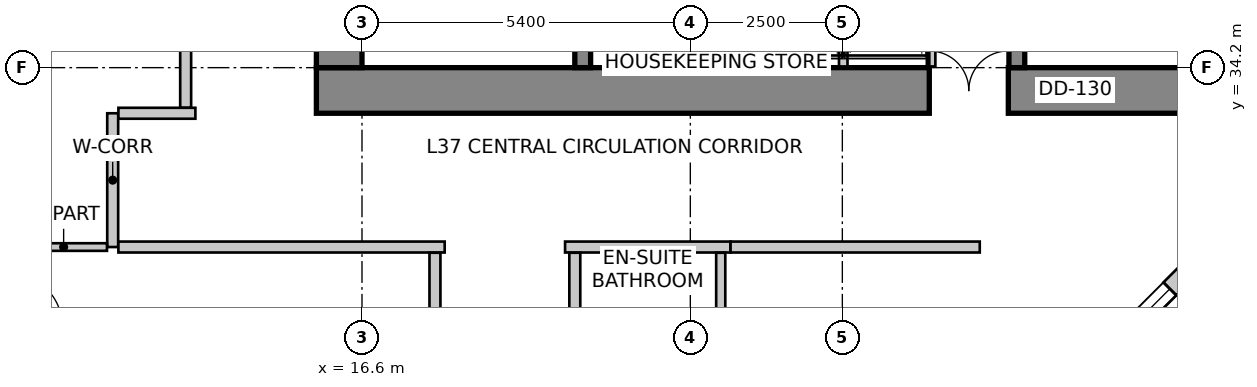
"""IFC4 building model, lengths in metres.
Left out: names, types, materials, properties, quantities, classifications, styles, units other than length and angle.
Written with IfcOpenShell. Run it as: python <this file> out.ifc"""

import sys

from ifc_helpers import new_model, si_unit, direction, frame, frame_2d, origin, place, context, subcontext, project, spatial, rectangle, extrude, source, transform, mapped, element, fill, save


model = new_model("IFC4")
c1 = context("Model", 3, precision=1e-05, world=origin(), true_north=direction((0.0, 1.0)))
c2 = subcontext(c1, "Body", "Model", "MODEL_VIEW")
j1 = project(units=[si_unit("LENGTHUNIT", "METRE"), si_unit("PLANEANGLEUNIT", "RADIAN")], contexts=[c1])
p1 = place(None, origin())
s1 = spatial("IfcSite", under=j1, at=p1, CompositionType="ELEMENT")
p2 = place(p1, origin())
s2 = spatial("IfcBuilding", under=s1, at=p2, CompositionType="ELEMENT")
p3 = place(p2, frame((0.0, 0.0, 150.2)))
s3 = spatial("IfcBuildingStorey", under=s2, at=p3, CompositionType="ELEMENT", Elevation=150.2)
p4 = place(p3, frame((15.85, 33.825, 0.0), z_axis=(0.0, 0.0, 1.0), x_axis=(1.0, 0.0, 0.0)))
e1 = element("IfcWall", 1, at=p4, inside=s3, PredefinedType="SHEAR", context=c2, shape_type="SweptSolid", body=[
    extrude(rectangle(XDim=15.9, YDim=0.75, at=frame_2d((7.95, 0.0))), origin(), (0.0, 0.0, 1.0), 3.6),
])
m1 = source(origin(), c2, "Body", "SweptSolid", [
    extrude(rectangle(XDim=1.3, YDim=2.15, at=frame_2d((0.65, 1.075))), frame((0.0, 0.385, 0.0), z_axis=(0.0, -1.0, 0.0), x_axis=(1.0, 0.0, 0.0)), (0.0, 0.0, 1.0), 0.77),
])
p5 = place(p4, frame((10.08, 0.0, 0.0)))
e2 = element("IfcOpeningElement", 2, at=p5, cuts=e1, PredefinedType="OPENING", context=c2, shape_type="MappedRepresentation", body=[
    mapped(m1, transform((0.0, 0.0, 0.0), scale=1.0)),
])
p6 = place(p3, frame((16.225, 34.2, 0.0), z_axis=(0.0, 0.0, 1.0), x_axis=(0.0, 1.0, 0.0)))
e3 = element("IfcWall", 3, at=p6, inside=s3, PredefinedType="SHEAR", context=c2, shape_type="SweptSolid", body=[
    extrude(rectangle(XDim=11.4, YDim=0.75, at=frame_2d((5.7, 0.0))), origin(), (0.0, 0.0, 1.0), 3.6),
])
m2 = source(origin(), c2, "Body", "SweptSolid", [
    extrude(rectangle(XDim=1.1, YDim=2.15, at=frame_2d((0.55, 1.075))), frame((0.0, 0.385, 0.0), z_axis=(0.0, -1.0, 0.0), x_axis=(1.0, 0.0, 0.0)), (0.0, 0.0, 1.0), 0.77),
])
p7 = place(p6, frame((7.15, 0.0, 0.0)))
e4 = element("IfcOpeningElement", 4, at=p7, cuts=e3, PredefinedType="OPENING", context=c2, shape_type="MappedRepresentation", body=[
    mapped(m2, transform((0.0, 0.0, 0.0), scale=1.0)),
])
p8 = place(p3, frame((20.23, 34.2, 0.0), z_axis=(0.0, 0.0, 1.0), x_axis=(0.0, 1.0, 0.0)))
e5 = element("IfcWall", 5, at=p8, inside=s3, PredefinedType="SHEAR", context=c2, shape_type="SweptSolid", body=[
    extrude(rectangle(XDim=9.06, YDim=0.26, at=frame_2d((4.53, 0.0))), origin(), (0.0, 0.0, 1.0), 3.6),
])
m3 = source(origin(), c2, "Body", "SweptSolid", [
    extrude(rectangle(XDim=1.1, YDim=2.15, at=frame_2d((0.55, 1.075))), frame((0.0, 0.14, 0.0), z_axis=(0.0, -1.0, 0.0), x_axis=(1.0, 0.0, 0.0)), (0.0, 0.0, 1.0), 0.28),
])
p9 = place(p8, frame((7.45, 0.0, 0.0)))
e6 = element("IfcOpeningElement", 6, at=p9, cuts=e5, PredefinedType="OPENING", context=c2, shape_type="MappedRepresentation", body=[
    mapped(m3, transform((0.0, 0.0, 0.0), scale=1.0)),
])
p10 = place(p3, frame((27.37, 34.2, 0.0), z_axis=(0.0, 0.0, 1.0), x_axis=(0.0, 1.0, 0.0)))
e7 = element("IfcWall", 7, at=p10, inside=s3, PredefinedType="SHEAR", context=c2, shape_type="SweptSolid", body=[
    extrude(rectangle(XDim=9.06, YDim=0.26, at=frame_2d((4.53, 0.0))), origin(), (0.0, 0.0, 1.0), 3.6),
])
p11 = place(p10, frame((7.45, 0.0, 0.0)))
e8 = element("IfcOpeningElement", 8, at=p11, cuts=e7, PredefinedType="OPENING", context=c2, shape_type="MappedRepresentation", body=[
    mapped(m3, transform((0.0, 0.0, 0.0), scale=1.0)),
])
p12 = place(p3, frame((28.116, 28.792, 0.0), z_axis=(0.0, 0.0, 1.0), x_axis=(0.707064797706, 0.707148762175, 0.0)))
e9 = element("IfcWall", 9, at=p12, inside=s3, PredefinedType="SOLIDWALL", context=c2, shape_type="SweptSolid", body=[
    extrude(rectangle(XDim=2.908, YDim=0.3, at=frame_2d((1.454, 0.0))), origin(), (0.0, 0.0, 1.0), 3.35),
])
m4 = source(origin(), c2, "Body", "SweptSolid", [
    extrude(rectangle(XDim=2.1, YDim=2.0, at=frame_2d((1.05, 1.0))), frame((0.0, 0.16, 0.0), z_axis=(0.0, -1.0, 0.0), x_axis=(1.0, 0.0, 0.0)), (0.0, 0.0, 1.0), 0.32),
])
p13 = place(p12, frame((0.404, 0.0, 0.85)))
e10 = element("IfcOpeningElement", 10, at=p13, cuts=e9, PredefinedType="OPENING", context=c2, shape_type="MappedRepresentation", body=[
    mapped(m4, transform((0.0, 0.0, 0.0), scale=1.0)),
])
p14 = place(p3, frame((13.269, 47.134, 0.0), z_axis=(0.0, 0.0, 1.0), x_axis=(-0.319929773322, -0.947441259468, 0.0)))
e11 = element("IfcWall", 11, at=p14, inside=s3, PredefinedType="SOLIDWALL", context=c2, shape_type="SweptSolid", body=[
    extrude(rectangle(XDim=16.134, YDim=0.3, at=frame_2d((8.067, 0.0))), origin(), (0.0, 0.0, 1.0), 3.35),
])
p15 = place(p14, frame((2.426, 0.0, 0.85)))
e12 = element("IfcOpeningElement", 12, at=p15, cuts=e11, PredefinedType="OPENING", context=c2, shape_type="MappedRepresentation", body=[
    mapped(m4, transform((0.0, 0.0, 0.0), scale=1.0)),
])
m5 = source(origin(), c2, "Body", "SweptSolid", [
    extrude(rectangle(XDim=2.4, YDim=2.2, at=frame_2d((1.2, 1.1))), frame((0.0, 0.16, 0.0), z_axis=(0.0, -1.0, 0.0), x_axis=(1.0, 0.0, 0.0)), (0.0, 0.0, 1.0), 0.32),
])
p16 = place(p14, frame((7.211, 0.0, 0.85)))
e13 = element("IfcOpeningElement", 13, at=p16, cuts=e11, PredefinedType="OPENING", context=c2, shape_type="MappedRepresentation", body=[
    mapped(m5, transform((0.0, 0.0, 0.0), scale=1.0)),
])
p17 = place(p14, frame((12.296, 0.0, 0.85)))
e14 = element("IfcOpeningElement", 14, at=p17, cuts=e11, PredefinedType="OPENING", context=c2, shape_type="MappedRepresentation", body=[
    mapped(m4, transform((0.0, 0.0, 0.0), scale=1.0)),
])
p18 = place(p3, frame((8.187, 31.834, 0.0), z_axis=(0.0, 0.0, 1.0), x_axis=(0.198869838988, -0.980025911464, 0.0)))
e15 = element("IfcWall", 15, at=p18, inside=s3, PredefinedType="SOLIDWALL", context=c2, shape_type="SweptSolid", body=[
    extrude(rectangle(XDim=16.363, YDim=0.3, at=frame_2d((8.182, 0.0))), origin(), (0.0, 0.0, 1.0), 3.35),
])
m6 = source(origin(), c2, "Body", "SweptSolid", [
    extrude(rectangle(XDim=1.5, YDim=1.8, at=frame_2d((0.75, 0.9))), frame((0.0, 0.16, 0.0), z_axis=(0.0, -1.0, 0.0), x_axis=(1.0, 0.0, 0.0)), (0.0, 0.0, 1.0), 0.32),
])
p19 = place(p18, frame((0.981, 0.0, 0.85)))
e16 = element("IfcOpeningElement", 16, at=p19, cuts=e15, PredefinedType="OPENING", context=c2, shape_type="MappedRepresentation", body=[
    mapped(m6, transform((0.0, 0.0, 0.0), scale=1.0)),
])
p20 = place(p18, frame((4.195, 0.0, 0.85)))
e17 = element("IfcOpeningElement", 17, at=p20, cuts=e15, PredefinedType="OPENING", context=c2, shape_type="MappedRepresentation", body=[
    mapped(m5, transform((0.0, 0.0, 0.0), scale=1.0)),
])
p21 = place(p18, frame((9.007, 0.0, 0.85)))
e18 = element("IfcOpeningElement", 18, at=p21, cuts=e15, PredefinedType="OPENING", context=c2, shape_type="MappedRepresentation", body=[
    mapped(m4, transform((0.0, 0.0, 0.0), scale=1.0)),
])
p22 = place(p18, frame((13.236, 0.0, 0.85)))
e19 = element("IfcOpeningElement", 19, at=p22, cuts=e15, PredefinedType="OPENING", context=c2, shape_type="MappedRepresentation", body=[
    mapped(m5, transform((0.0, 0.0, 0.0), scale=1.0)),
])
for number, where, z_axis, x_axis in (
    (20, (25.96, 34.22, 0.0), (0.0, 0.0, 1.0), (0.0, 1.0, 0.0)),
    (21, (23.07, 34.22, 0.0), (0.0, 0.0, 1.0), (0.0, 1.0, 0.0)),
    (22, (24.515, 34.22, 0.0), (0.0, 0.0, 1.0), (0.0, 1.0, 0.0)),
):
    element("IfcWall", number, at=place(p3, frame(where, z_axis=z_axis, x_axis=x_axis)), inside=s3, PredefinedType="SOLIDWALL", context=c2, shape_type="SweptSolid", body=[
        extrude(rectangle(XDim=1.62, YDim=0.14, at=frame_2d((0.81, 0.0))), origin(), (0.0, 0.0, 1.0), 2.642),
    ])
p23 = place(p3, frame((12.5, 31.25, 0.0), z_axis=(0.0, 0.0, 1.0), x_axis=(0.0, 1.0, 0.0)))
e23 = element("IfcWall", 23, at=p23, inside=s3, PredefinedType="PARTITIONING", context=c2, shape_type="SweptSolid", body=[
    extrude(rectangle(XDim=2.2, YDim=0.18, at=frame_2d((1.1, 0.0))), origin(), (0.0, 0.0, 1.0), 3.019),
])
p24 = place(p3, frame((12.594, 33.45, 0.0), z_axis=(0.0, 0.0, 1.0), x_axis=(1.0, 0.0, 0.0)))
e24 = element("IfcWall", 24, at=p24, inside=s3, PredefinedType="PARTITIONING", context=c2, shape_type="SweptSolid", body=[
    extrude(rectangle(XDim=1.266, YDim=0.18, at=frame_2d((0.633, 0.0))), origin(), (0.0, 0.0, 1.0), 3.35),
])
p25 = place(p3, frame((17.96, 31.25, 0.0), z_axis=(0.0, 0.0, 1.0), x_axis=(-1.0, 0.0, 0.0)))
e25 = element("IfcWall", 25, at=p25, inside=s3, PredefinedType="PARTITIONING", context=c2, shape_type="SweptSolid", body=[
    extrude(rectangle(XDim=5.366, YDim=0.18, at=frame_2d((2.683, 0.0))), origin(), (0.0, 0.0, 1.0), 3.019),
])
p26 = place(p3, frame((22.66, 31.25, 0.0), z_axis=(0.0, 0.0, 1.0), x_axis=(-1.0, 0.0, 0.0)))
e26 = element("IfcWall", 26, at=p26, inside=s3, PredefinedType="PARTITIONING", context=c2, shape_type="SweptSolid", body=[
    extrude(rectangle(XDim=2.72, YDim=0.18, at=frame_2d((1.36, 0.0))), origin(), (0.0, 0.0, 1.0), 3.019),
])
p27 = place(p3, frame((26.76, 31.25, 0.0), z_axis=(0.0, 0.0, 1.0), x_axis=(-1.0, 0.0, 0.0)))
e27 = element("IfcWall", 27, at=p27, inside=s3, PredefinedType="PARTITIONING", context=c2, shape_type="SweptSolid", body=[
    extrude(rectangle(XDim=4.098, YDim=0.18, at=frame_2d((2.049, 0.0))), origin(), (0.0, 0.0, 1.0), 3.35),
])
p28 = place(p3, frame((13.7, 33.544, 0.0), z_axis=(0.0, 0.0, 1.0), x_axis=(0.0, 1.0, 0.0)))
e28 = element("IfcWall", 28, at=p28, inside=s3, PredefinedType="PARTITIONING", context=c2, shape_type="SweptSolid", body=[
    extrude(rectangle(XDim=13.86, YDim=0.18, at=frame_2d((6.93, 0.0))), origin(), (0.0, 0.0, 1.0), 2.492),
])
m7 = source(origin(), c2, "Body", "SweptSolid", [
    extrude(rectangle(XDim=0.9, YDim=2.15, at=frame_2d((0.45, 1.075))), frame((0.0, 0.1, 0.0), z_axis=(0.0, -1.0, 0.0), x_axis=(1.0, 0.0, 0.0)), (0.0, 0.0, 1.0), 0.2),
])
p29 = place(p28, frame((4.253, 0.0, 0.0)))
e29 = element("IfcOpeningElement", 29, at=p29, cuts=e28, PredefinedType="OPENING", context=c2, shape_type="MappedRepresentation", body=[
    mapped(m7, transform((0.0, 0.0, 0.0), scale=1.0)),
])
p30 = place(p3, frame((12.406, 31.25, 0.0), z_axis=(0.0, 0.0, 1.0), x_axis=(-1.0, 0.0, 0.0)))
e30 = element("IfcWall", 30, at=p30, inside=s3, PredefinedType="PARTITIONING", context=c2, shape_type="SweptSolid", body=[
    extrude(rectangle(XDim=1.426, YDim=0.125, at=frame_2d((0.713, 0.0))), origin(), (0.0, 0.0, 1.0), 2.492),
])
p31 = place(p3, frame((17.8, 19.5, 0.0), z_axis=(0.0, 0.0, 1.0), x_axis=(0.0, 1.0, 0.0)))
e31 = element("IfcWall", 31, at=p31, inside=s3, PredefinedType="PARTITIONING", context=c2, shape_type="SweptSolid", body=[
    extrude(rectangle(XDim=11.656, YDim=0.18, at=frame_2d((5.828, 0.0))), origin(), (0.0, 0.0, 1.0), 2.803),
])
p32 = place(p31, frame((5.378, 0.0, 0.0)))
e32 = element("IfcOpeningElement", 32, at=p32, cuts=e31, PredefinedType="OPENING", context=c2, shape_type="MappedRepresentation", body=[
    mapped(m7, transform((0.0, 0.0, 0.0), scale=1.0)),
])
p33 = place(p3, frame((20.1, 31.156, 0.0), z_axis=(0.0, 0.0, 1.0), x_axis=(0.0, -1.0, 0.0)))
e33 = element("IfcWall", 33, at=p33, inside=s3, PredefinedType="PARTITIONING", context=c2, shape_type="SweptSolid", body=[
    extrude(rectangle(XDim=2.266, YDim=0.18, at=frame_2d((1.133, 0.0))), origin(), (0.0, 0.0, 1.0), 3.019),
])
p34 = place(p3, frame((22.5, 31.156, 0.0), z_axis=(0.0, 0.0, 1.0), x_axis=(0.0, -1.0, 0.0)))
e34 = element("IfcWall", 34, at=p34, inside=s3, PredefinedType="PARTITIONING", context=c2, shape_type="SweptSolid", body=[
    extrude(rectangle(XDim=2.027, YDim=0.15, at=frame_2d((1.014, 0.0))), origin(), (0.0, 0.0, 1.0), 3.019),
])
m8 = source(origin(), c2, "Body", "SweptSolid", [
    extrude(rectangle(XDim=2.1, YDim=2.0, at=frame_2d((1.05, 1.0))), frame((0.0, -0.015, 0.0), z_axis=(0.0, -1.0, 0.0), x_axis=(1.0, 0.0, 0.0)), (0.0, 0.0, 1.0), 0.06),
])
p35 = place(p13, origin())
e35 = element("IfcWindow", 35, at=p35, inside=s3, PartitioningType="SINGLE_PANEL", PredefinedType="WINDOW", context=c2, shape_type="MappedRepresentation", body=[
    mapped(m8, transform((0.0, 0.0, 0.0), scale=1.0)),
])
fill(e10, e35)
m9 = source(origin(), c2, "Body", "SweptSolid", [
    extrude(rectangle(XDim=1.3, YDim=2.15, at=frame_2d((0.65, 1.075))), frame((0.0, 0.025, 0.0), z_axis=(0.0, -1.0, 0.0), x_axis=(1.0, 0.0, 0.0)), (0.0, 0.0, 1.0), 0.05),
])
p36 = place(p5, origin())
e36 = element("IfcDoor", 36, at=p36, inside=s3, OperationType="DOUBLE_DOOR_SINGLE_SWING", PredefinedType="DOOR", context=c2, shape_type="MappedRepresentation", body=[
    mapped(m9, transform((0.0, 0.0, 0.0), scale=1.0)),
])
fill(e2, e36)
save(model, sys.argv[1])
